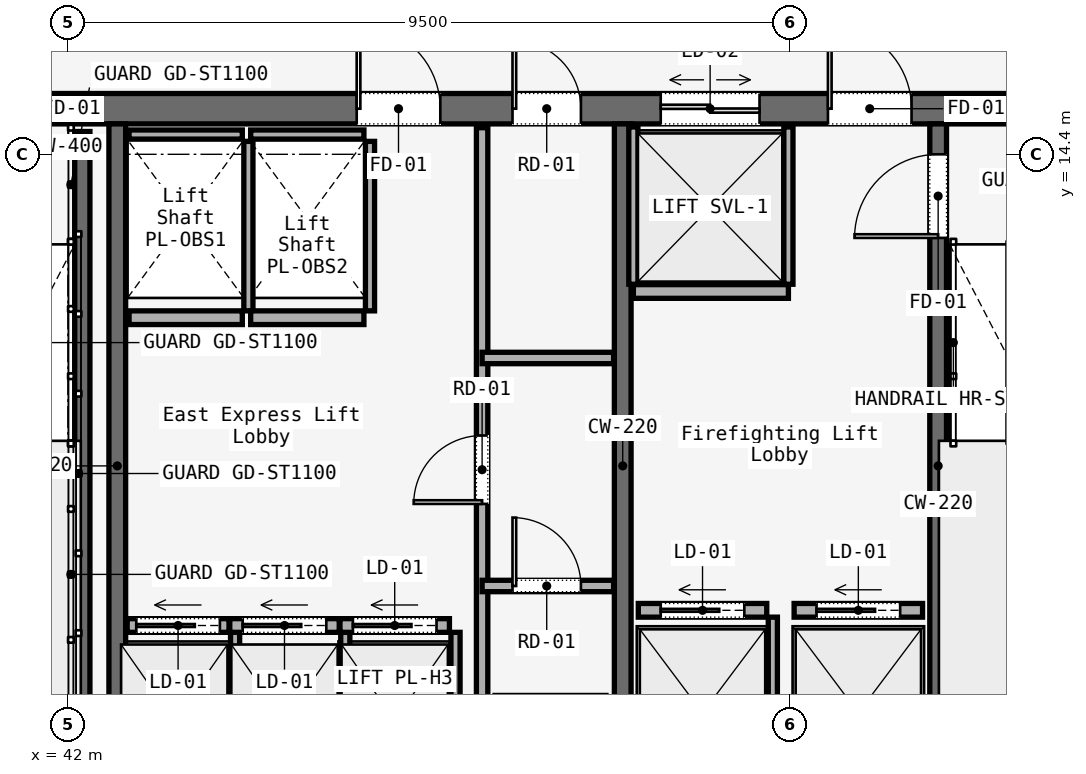
"""IFC4 building model, lengths in metres.
Left out: names, types, materials, properties, quantities, classifications, styles, units other than length and angle.
Written with IfcOpenShell. Run it as: python <this file> out.ifc"""

import sys

from ifc_helpers import new_model, si_unit, direction, frame, frame_2d, origin, place, context, subcontext, project, spatial, rectangle, extrude, element, fill, save


model = new_model("IFC4")
c1 = context("Model", 3, precision=1e-05, world=origin(), true_north=direction((0.0, 1.0)))
c2 = subcontext(c1, "Body", "Model", "MODEL_VIEW")
j1 = project(units=[si_unit("LENGTHUNIT", "METRE"), si_unit("PLANEANGLEUNIT", "RADIAN")], contexts=[c1])
p1 = place(None, origin())
s1 = spatial("IfcSite", under=j1, at=p1, CompositionType="ELEMENT")
p2 = place(p1, origin())
s2 = spatial("IfcBuilding", under=s1, at=p2, CompositionType="ELEMENT")
p3 = place(p2, frame((0.0, 0.0, 244.6)))
s3 = spatial("IfcBuildingStorey", under=s2, at=p3, CompositionType="ELEMENT", Elevation=244.6)
p4 = place(p3, frame((26.45, 15.0, 0.0), z_axis=(0.0, 0.0, 1.0), x_axis=(1.0, 0.0, 0.0)))
e1 = element("IfcWall", 1, at=p4, inside=s3, PredefinedType="SOLIDWALL", context=c2, shape_type="SweptSolid", body=[
    extrude(rectangle(XDim=31.1, YDim=0.4, at=frame_2d((15.55, 0.0))), origin(), (0.0, 0.0, 1.0), 3.58),
])
p5 = place(p4, frame((1.65, 0.0, 0.0)))
e2 = element("IfcOpeningElement", 2, at=p5, cuts=e1, PredefinedType="OPENING", context=c2, shape_type="SweptSolid", body=[
    extrude(rectangle(XDim=1.1, YDim=2.2, at=frame_2d((0.55, 1.1))), frame((0.0, 0.2, 0.0), z_axis=(0.0, -1.0, 0.0), x_axis=(1.0, 0.0, 0.0)), (0.0, 0.0, 1.0), 0.4),
])
p6 = place(p4, frame((13.65, 0.0, 0.0)))
e3 = element("IfcOpeningElement", 3, at=p6, cuts=e1, PredefinedType="OPENING", context=c2, shape_type="SweptSolid", body=[
    extrude(rectangle(XDim=1.1, YDim=2.2, at=frame_2d((0.55, 1.1))), frame((0.0, 0.2, 0.0), z_axis=(0.0, -1.0, 0.0), x_axis=(1.0, 0.0, 0.0)), (0.0, 0.0, 1.0), 0.4),
])
p7 = place(p4, frame((25.55, 0.0, 0.0)))
e4 = element("IfcOpeningElement", 4, at=p7, cuts=e1, PredefinedType="OPENING", context=c2, shape_type="SweptSolid", body=[
    extrude(rectangle(XDim=1.1, YDim=2.2, at=frame_2d((0.55, 1.1))), frame((0.0, 0.2, 0.0), z_axis=(0.0, -1.0, 0.0), x_axis=(1.0, 0.0, 0.0)), (0.0, 0.0, 1.0), 0.4),
])
p8 = place(p4, frame((19.35, 0.0, 0.0)))
e5 = element("IfcOpeningElement", 5, at=p8, cuts=e1, PredefinedType="OPENING", context=c2, shape_type="SweptSolid", body=[
    extrude(rectangle(XDim=1.1, YDim=2.2, at=frame_2d((0.55, 1.1))), frame((0.0, 0.2, 0.0), z_axis=(0.0, -1.0, 0.0), x_axis=(1.0, 0.0, 0.0)), (0.0, 0.0, 1.0), 0.4),
])
p9 = place(p4, frame((21.4, 0.0, 0.0)))
e6 = element("IfcOpeningElement", 6, at=p9, cuts=e1, PredefinedType="OPENING", context=c2, shape_type="SweptSolid", body=[
    extrude(rectangle(XDim=0.9, YDim=2.1, at=frame_2d((0.45, 1.05))), frame((0.0, 0.2, 0.0), z_axis=(0.0, -1.0, 0.0), x_axis=(1.0, 0.0, 0.0)), (0.0, 0.0, 1.0), 0.4),
])
p10 = place(p4, frame((5.54, 0.0, 0.0)))
e7 = element("IfcOpeningElement", 7, at=p10, cuts=e1, PredefinedType="OPENING", context=c2, shape_type="SweptSolid", body=[
    extrude(rectangle(XDim=0.95, YDim=2.2, at=frame_2d((0.475, 1.1))), frame((0.0, 0.2, 0.0), z_axis=(0.0, -1.0, 0.0), x_axis=(1.0, 0.0, 0.0)), (0.0, 0.0, 1.0), 0.4),
])
p11 = place(p4, frame((9.49, 0.0, 0.0)))
e8 = element("IfcOpeningElement", 8, at=p11, cuts=e1, PredefinedType="OPENING", context=c2, shape_type="SweptSolid", body=[
    extrude(rectangle(XDim=0.95, YDim=2.2, at=frame_2d((0.475, 1.1))), frame((0.0, 0.2, 0.0), z_axis=(0.0, -1.0, 0.0), x_axis=(1.0, 0.0, 0.0)), (0.0, 0.0, 1.0), 0.4),
])
p12 = place(p4, frame((23.35, 0.0, 0.0)))
e9 = element("IfcOpeningElement", 9, at=p12, cuts=e1, PredefinedType="OPENING", context=c2, shape_type="SweptSolid", body=[
    extrude(rectangle(XDim=1.3, YDim=2.3, at=frame_2d((0.65, 1.15))), frame((0.0, 0.2, 0.0), z_axis=(0.0, -1.0, 0.0), x_axis=(1.0, 0.0, 0.0)), (0.0, 0.0, 1.0), 0.4),
])
for number, where, z_axis, x_axis in (
    (10, (42.65, 5.8, 0.0), (0.0, 0.0, 1.0), (0.0, 1.0, 0.0)),
    (11, (49.3, 5.8, 0.0), (0.0, 0.0, 1.0), (0.0, 1.0, 0.0)),
):
    element("IfcWall", number, at=place(p3, frame(where, z_axis=z_axis, x_axis=x_axis)), inside=s3, PredefinedType="SOLIDWALL", context=c2, shape_type="SweptSolid", body=[
        extrude(rectangle(XDim=9.0, YDim=0.22, at=frame_2d((4.5, 0.0))), origin(), (0.0, 0.0, 1.0), 3.58),
    ])
p13 = place(p3, frame((53.45, 5.8, 0.0), z_axis=(0.0, 0.0, 1.0), x_axis=(0.0, 1.0, 0.0)))
e12 = element("IfcWall", 12, at=p13, inside=s3, PredefinedType="SOLIDWALL", context=c2, shape_type="SweptSolid", body=[
    extrude(rectangle(XDim=9.0, YDim=0.22, at=frame_2d((4.5, 0.0))), origin(), (0.0, 0.0, 1.0), 3.58),
])
p14 = place(p13, frame((7.5, 0.0, 0.0)))
e13 = element("IfcOpeningElement", 13, at=p14, cuts=e12, PredefinedType="OPENING", context=c2, shape_type="SweptSolid", body=[
    extrude(rectangle(XDim=1.1, YDim=2.2, at=frame_2d((0.55, 1.1))), frame((0.0, 0.11, 0.0), z_axis=(0.0, -1.0, 0.0), x_axis=(1.0, 0.0, 0.0)), (0.0, 0.0, 1.0), 0.22),
])
p15 = place(p3, frame((42.19, 14.7, 0.0), z_axis=(0.0, 0.0, 1.0), x_axis=(0.0, -1.0, 0.0)))
e14 = element("IfcWall", 14, at=p15, inside=s3, PredefinedType="SOLIDWALL", context=c2, shape_type="SweptSolid", body=[
    extrude(rectangle(XDim=7.65, YDim=0.2, at=frame_2d((3.825, 0.0))), origin(), (0.0, 0.0, 1.0), 3.8),
])
p16 = place(p3, frame((47.45, 5.9, 0.0), z_axis=(0.0, 0.0, 1.0), x_axis=(0.0, 1.0, 0.0)))
e15 = element("IfcWall", 15, at=p16, inside=s3, PredefinedType="PARTITIONING", context=c2, shape_type="SweptSolid", body=[
    extrude(rectangle(XDim=8.85, YDim=0.15, at=frame_2d((4.425, 0.0))), origin(), (0.0, 0.0, 1.0), 3.01),
])
p17 = place(p16, frame((3.9, 0.0, 0.0)))
e16 = element("IfcOpeningElement", 16, at=p17, cuts=e15, PredefinedType="OPENING", context=c2, shape_type="SweptSolid", body=[
    extrude(rectangle(XDim=0.9, YDim=2.1, at=frame_2d((0.45, 1.05))), frame((0.0, 0.075, 0.0), z_axis=(0.0, -1.0, 0.0), x_axis=(1.0, 0.0, 0.0)), (0.0, 0.0, 1.0), 0.15),
])
p18 = place(p3, frame((47.45, 8.72, 0.0), z_axis=(0.0, 0.0, 1.0), x_axis=(1.0, 0.0, 0.0)))
e17 = element("IfcWall", 17, at=p18, inside=s3, PredefinedType="PARTITIONING", context=c2, shape_type="SweptSolid", body=[
    extrude(rectangle(XDim=1.73, YDim=0.15, at=frame_2d((0.865, 0.0))), origin(), (0.0, 0.0, 1.0), 3.01),
])
p19 = place(p18, frame((0.4, 0.0, 0.0)))
e18 = element("IfcOpeningElement", 18, at=p19, cuts=e17, PredefinedType="OPENING", context=c2, shape_type="SweptSolid", body=[
    extrude(rectangle(XDim=0.9, YDim=2.1, at=frame_2d((0.45, 1.05))), frame((0.0, 0.075, 0.0), z_axis=(0.0, -1.0, 0.0), x_axis=(1.0, 0.0, 0.0)), (0.0, 0.0, 1.0), 0.15),
])
p20 = place(p3, frame((47.45, 11.72, 0.0), z_axis=(0.0, 0.0, 1.0), x_axis=(1.0, 0.0, 0.0)))
e19 = element("IfcWall", 19, at=p20, inside=s3, PredefinedType="PARTITIONING", context=c2, shape_type="SweptSolid", body=[
    extrude(rectangle(XDim=1.73, YDim=0.15, at=frame_2d((0.865, 0.0))), origin(), (0.0, 0.0, 1.0), 3.01),
])
p21 = place(p3, frame((42.78, 8.2, 0.0), z_axis=(0.0, 0.0, 1.0), x_axis=(1.0, 0.0, 0.0)))
e20 = element("IfcWall", 20, at=p21, inside=s3, PredefinedType="SOLIDWALL", context=c2, shape_type="SweptSolid", body=[
    extrude(rectangle(XDim=1.34, YDim=0.18, at=frame_2d((0.67, 0.0))), origin(), (0.0, 0.0, 1.0), 3.01),
])
p22 = place(p21, frame((0.12, 0.0, 0.0)))
e21 = element("IfcOpeningElement", 21, at=p22, cuts=e20, PredefinedType="OPENING", context=c2, shape_type="SweptSolid", body=[
    extrude(rectangle(XDim=1.1, YDim=2.2, at=frame_2d((0.55, 1.1))), frame((0.0, 0.09, 0.0), z_axis=(0.0, -1.0, 0.0), x_axis=(1.0, 0.0, 0.0)), (0.0, 0.0, 1.0), 0.18),
])
p23 = place(p3, frame((44.2, 5.93, 0.0), z_axis=(0.0, 0.0, 1.0), x_axis=(0.0, 1.0, 0.0)))
e22 = element("IfcWall", 22, at=p23, inside=s3, PredefinedType="SOLIDWALL", context=c2, shape_type="SweptSolid", body=[
    extrude(rectangle(XDim=2.18, YDim=0.12, at=frame_2d((1.09, 0.0))), origin(), (0.0, 0.0, 1.0), 3.01),
])
p24 = place(p3, frame((44.13, 8.2, 0.0), z_axis=(0.0, 0.0, 1.0), x_axis=(1.0, 0.0, 0.0)))
e23 = element("IfcWall", 23, at=p24, inside=s3, PredefinedType="SOLIDWALL", context=c2, shape_type="SweptSolid", body=[
    extrude(rectangle(XDim=1.44, YDim=0.18, at=frame_2d((0.72, 0.0))), origin(), (0.0, 0.0, 1.0), 3.01),
])
p25 = place(p24, frame((0.17, 0.0, 0.0)))
e24 = element("IfcOpeningElement", 24, at=p25, cuts=e23, PredefinedType="OPENING", context=c2, shape_type="SweptSolid", body=[
    extrude(rectangle(XDim=1.1, YDim=2.2, at=frame_2d((0.55, 1.1))), frame((0.0, 0.09, 0.0), z_axis=(0.0, -1.0, 0.0), x_axis=(1.0, 0.0, 0.0)), (0.0, 0.0, 1.0), 0.18),
])
p26 = place(p3, frame((45.65, 5.93, 0.0), z_axis=(0.0, 0.0, 1.0), x_axis=(0.0, 1.0, 0.0)))
e25 = element("IfcWall", 25, at=p26, inside=s3, PredefinedType="SOLIDWALL", context=c2, shape_type="SweptSolid", body=[
    extrude(rectangle(XDim=2.18, YDim=0.12, at=frame_2d((1.09, 0.0))), origin(), (0.0, 0.0, 1.0), 3.01),
])
p27 = place(p3, frame((45.58, 8.2, 0.0), z_axis=(0.0, 0.0, 1.0), x_axis=(1.0, 0.0, 0.0)))
e26 = element("IfcWall", 26, at=p27, inside=s3, PredefinedType="SOLIDWALL", context=c2, shape_type="SweptSolid", body=[
    extrude(rectangle(XDim=1.44, YDim=0.18, at=frame_2d((0.72, 0.0))), origin(), (0.0, 0.0, 1.0), 3.01),
])
p28 = place(p27, frame((0.17, 0.0, 0.0)))
e27 = element("IfcOpeningElement", 27, at=p28, cuts=e26, PredefinedType="OPENING", context=c2, shape_type="SweptSolid", body=[
    extrude(rectangle(XDim=1.1, YDim=2.2, at=frame_2d((0.55, 1.1))), frame((0.0, 0.09, 0.0), z_axis=(0.0, -1.0, 0.0), x_axis=(1.0, 0.0, 0.0)), (0.0, 0.0, 1.0), 0.18),
])
p29 = place(p3, frame((47.1, 5.93, 0.0), z_axis=(0.0, 0.0, 1.0), x_axis=(0.0, 1.0, 0.0)))
e28 = element("IfcWall", 28, at=p29, inside=s3, PredefinedType="SOLIDWALL", context=c2, shape_type="SweptSolid", body=[
    extrude(rectangle(XDim=2.18, YDim=0.12, at=frame_2d((1.09, 0.0))), origin(), (0.0, 0.0, 1.0), 3.01),
])
p30 = place(p3, frame((42.805, 12.25, 0.0), z_axis=(0.0, 0.0, 1.0), x_axis=(1.0, 0.0, 0.0)))
e29 = element("IfcWall", 29, at=p30, inside=s3, PredefinedType="SOLIDWALL", context=c2, shape_type="SweptSolid", body=[
    extrude(rectangle(XDim=1.49, YDim=0.18, at=frame_2d((0.745, 0.0))), origin(), (0.0, 0.0, 1.0), 3.01),
])
p31 = place(p3, frame((42.805, 14.66, 0.0), z_axis=(0.0, 0.0, 1.0), x_axis=(1.0, 0.0, 0.0)))
e30 = element("IfcWall", 30, at=p31, inside=s3, PredefinedType="SOLIDWALL", context=c2, shape_type="SweptSolid", body=[
    extrude(rectangle(XDim=1.49, YDim=0.12, at=frame_2d((0.745, 0.0))), origin(), (0.0, 0.0, 1.0), 3.01),
])
p32 = place(p3, frame((44.375, 12.34, 0.0), z_axis=(0.0, 0.0, 1.0), x_axis=(0.0, 1.0, 0.0)))
e31 = element("IfcWall", 31, at=p32, inside=s3, PredefinedType="SOLIDWALL", context=c2, shape_type="SweptSolid", body=[
    extrude(rectangle(XDim=2.23, YDim=0.12, at=frame_2d((1.115, 0.0))), origin(), (0.0, 0.0, 1.0), 3.01),
])
p33 = place(p3, frame((44.405, 12.25, 0.0), z_axis=(0.0, 0.0, 1.0), x_axis=(1.0, 0.0, 0.0)))
e32 = element("IfcWall", 32, at=p33, inside=s3, PredefinedType="SOLIDWALL", context=c2, shape_type="SweptSolid", body=[
    extrude(rectangle(XDim=1.49, YDim=0.18, at=frame_2d((0.745, 0.0))), origin(), (0.0, 0.0, 1.0), 3.01),
])
p34 = place(p3, frame((44.405, 14.66, 0.0), z_axis=(0.0, 0.0, 1.0), x_axis=(1.0, 0.0, 0.0)))
e33 = element("IfcWall", 33, at=p34, inside=s3, PredefinedType="SOLIDWALL", context=c2, shape_type="SweptSolid", body=[
    extrude(rectangle(XDim=1.49, YDim=0.12, at=frame_2d((0.745, 0.0))), origin(), (0.0, 0.0, 1.0), 3.01),
])
p35 = place(p3, frame((45.975, 12.34, 0.0), z_axis=(0.0, 0.0, 1.0), x_axis=(0.0, 1.0, 0.0)))
e34 = element("IfcWall", 34, at=p35, inside=s3, PredefinedType="SOLIDWALL", context=c2, shape_type="SweptSolid", body=[
    extrude(rectangle(XDim=2.23, YDim=0.12, at=frame_2d((1.115, 0.0))), origin(), (0.0, 0.0, 1.0), 3.01),
])
p36 = place(p3, frame((49.505, 8.4, 0.0), z_axis=(0.0, 0.0, 1.0), x_axis=(1.0, 0.0, 0.0)))
e35 = element("IfcWall", 35, at=p36, inside=s3, PredefinedType="SOLIDWALL", context=c2, shape_type="SweptSolid", body=[
    extrude(rectangle(XDim=1.69, YDim=0.18, at=frame_2d((0.845, 0.0))), origin(), (0.0, 0.0, 1.0), 3.01),
])
p37 = place(p36, frame((0.295, 0.0, 0.0)))
e36 = element("IfcOpeningElement", 36, at=p37, cuts=e35, PredefinedType="OPENING", context=c2, shape_type="SweptSolid", body=[
    extrude(rectangle(XDim=1.1, YDim=2.2, at=frame_2d((0.55, 1.1))), frame((0.0, 0.09, 0.0), z_axis=(0.0, -1.0, 0.0), x_axis=(1.0, 0.0, 0.0)), (0.0, 0.0, 1.0), 0.18),
])
p38 = place(p3, frame((51.275, 5.93, 0.0), z_axis=(0.0, 0.0, 1.0), x_axis=(0.0, 1.0, 0.0)))
e37 = element("IfcWall", 37, at=p38, inside=s3, PredefinedType="SOLIDWALL", context=c2, shape_type="SweptSolid", body=[
    extrude(rectangle(XDim=2.38, YDim=0.12, at=frame_2d((1.19, 0.0))), origin(), (0.0, 0.0, 1.0), 3.01),
])
p39 = place(p3, frame((51.555, 8.4, 0.0), z_axis=(0.0, 0.0, 1.0), x_axis=(1.0, 0.0, 0.0)))
e38 = element("IfcWall", 38, at=p39, inside=s3, PredefinedType="SOLIDWALL", context=c2, shape_type="SweptSolid", body=[
    extrude(rectangle(XDim=1.69, YDim=0.18, at=frame_2d((0.845, 0.0))), origin(), (0.0, 0.0, 1.0), 3.01),
])
p40 = place(p39, frame((0.295, 0.0, 0.0)))
e39 = element("IfcOpeningElement", 39, at=p40, cuts=e38, PredefinedType="OPENING", context=c2, shape_type="SweptSolid", body=[
    extrude(rectangle(XDim=1.1, YDim=2.2, at=frame_2d((0.55, 1.1))), frame((0.0, 0.09, 0.0), z_axis=(0.0, -1.0, 0.0), x_axis=(1.0, 0.0, 0.0)), (0.0, 0.0, 1.0), 0.18),
])
p41 = place(p3, frame((49.44, 12.595, 0.0), z_axis=(0.0, 0.0, 1.0), x_axis=(1.0, 0.0, 0.0)))
e40 = element("IfcWall", 40, at=p41, inside=s3, PredefinedType="SOLIDWALL", context=c2, shape_type="SweptSolid", body=[
    extrude(rectangle(XDim=2.04, YDim=0.18, at=frame_2d((1.02, 0.0))), origin(), (0.0, 0.0, 1.0), 3.01),
])
for number, where, z_axis, x_axis in (
    (41, (49.44, 12.69, 0.0), (0.0, 0.0, 1.0), (0.0, 1.0, 0.0)),
    (42, (51.48, 12.69, 0.0), (0.0, 0.0, 1.0), (0.0, 1.0, 0.0)),
):
    element("IfcWall", number, at=place(p3, frame(where, z_axis=z_axis, x_axis=x_axis)), inside=s3, PredefinedType="SOLIDWALL", context=c2, shape_type="SweptSolid", body=[
        extrude(rectangle(XDim=2.07, YDim=0.12, at=frame_2d((1.035, 0.0))), origin(), (0.0, 0.0, 1.0), 3.01),
    ])
p42 = place(p7, origin())
e43 = element("IfcDoor", 43, at=p42, inside=s3, OperationType="SINGLE_SWING_RIGHT", PredefinedType="DOOR", context=c2, shape_type="SweptSolid", body=[
    extrude(rectangle(XDim=1.1, YDim=2.2, at=frame_2d((0.55, 1.1))), frame((0.0, 0.025, 0.0), z_axis=(0.0, -1.0, 0.0), x_axis=(1.0, 0.0, 0.0)), (0.0, 0.0, 1.0), 0.05),
])
fill(e4, e43)
p43 = place(p8, origin())
e44 = element("IfcDoor", 44, at=p43, inside=s3, OperationType="SINGLE_SWING_LEFT", PredefinedType="DOOR", context=c2, shape_type="SweptSolid", body=[
    extrude(rectangle(XDim=1.1, YDim=2.2, at=frame_2d((0.55, 1.1))), frame((0.0, 0.025, 0.0), z_axis=(0.0, -1.0, 0.0), x_axis=(1.0, 0.0, 0.0)), (0.0, 0.0, 1.0), 0.05),
])
fill(e5, e44)
p44 = place(p9, origin())
e45 = element("IfcDoor", 45, at=p44, inside=s3, OperationType="SINGLE_SWING_LEFT", PredefinedType="DOOR", context=c2, shape_type="SweptSolid", body=[
    extrude(rectangle(XDim=0.9, YDim=2.1, at=frame_2d((0.45, 1.05))), frame((0.0, 0.025, 0.0), z_axis=(0.0, -1.0, 0.0), x_axis=(1.0, 0.0, 0.0)), (0.0, 0.0, 1.0), 0.05),
])
fill(e6, e45)
p45 = place(p14, origin())
e46 = element("IfcDoor", 46, at=p45, inside=s3, OperationType="SINGLE_SWING_LEFT", PredefinedType="DOOR", context=c2, shape_type="SweptSolid", body=[
    extrude(rectangle(XDim=1.1, YDim=2.2, at=frame_2d((0.55, 1.1))), frame((0.0, 0.025, 0.0), z_axis=(0.0, -1.0, 0.0), x_axis=(1.0, 0.0, 0.0)), (0.0, 0.0, 1.0), 0.05),
])
fill(e13, e46)
p46 = place(p17, origin())
e47 = element("IfcDoor", 47, at=p46, inside=s3, OperationType="SINGLE_SWING_LEFT", PredefinedType="DOOR", context=c2, shape_type="SweptSolid", body=[
    extrude(rectangle(XDim=0.9, YDim=2.1, at=frame_2d((0.45, 1.05))), frame((0.0, 0.025, 0.0), z_axis=(0.0, -1.0, 0.0), x_axis=(1.0, 0.0, 0.0)), (0.0, 0.0, 1.0), 0.05),
])
fill(e16, e47)
p47 = place(p19, origin())
e48 = element("IfcDoor", 48, at=p47, inside=s3, OperationType="SINGLE_SWING_RIGHT", PredefinedType="DOOR", context=c2, shape_type="SweptSolid", body=[
    extrude(rectangle(XDim=0.9, YDim=2.1, at=frame_2d((0.45, 1.05))), frame((0.0, 0.025, 0.0), z_axis=(0.0, -1.0, 0.0), x_axis=(1.0, 0.0, 0.0)), (0.0, 0.0, 1.0), 0.05),
])
fill(e18, e48)
p48 = place(p22, origin())
e49 = element("IfcDoor", 49, at=p48, inside=s3, OperationType="SLIDING_TO_LEFT", PredefinedType="DOOR", context=c2, shape_type="SweptSolid", body=[
    extrude(rectangle(XDim=1.1, YDim=2.2, at=frame_2d((0.55, 1.1))), frame((0.0, 0.025, 0.0), z_axis=(0.0, -1.0, 0.0), x_axis=(1.0, 0.0, 0.0)), (0.0, 0.0, 1.0), 0.05),
])
fill(e21, e49)
p49 = place(p25, origin())
e50 = element("IfcDoor", 50, at=p49, inside=s3, OperationType="SLIDING_TO_LEFT", PredefinedType="DOOR", context=c2, shape_type="SweptSolid", body=[
    extrude(rectangle(XDim=1.1, YDim=2.2, at=frame_2d((0.55, 1.1))), frame((0.0, 0.025, 0.0), z_axis=(0.0, -1.0, 0.0), x_axis=(1.0, 0.0, 0.0)), (0.0, 0.0, 1.0), 0.05),
])
fill(e24, e50)
p50 = place(p28, origin())
e51 = element("IfcDoor", 51, at=p50, inside=s3, OperationType="SLIDING_TO_LEFT", PredefinedType="DOOR", context=c2, shape_type="SweptSolid", body=[
    extrude(rectangle(XDim=1.1, YDim=2.2, at=frame_2d((0.55, 1.1))), frame((0.0, 0.025, 0.0), z_axis=(0.0, -1.0, 0.0), x_axis=(1.0, 0.0, 0.0)), (0.0, 0.0, 1.0), 0.05),
])
fill(e27, e51)
p51 = place(p37, origin())
e52 = element("IfcDoor", 52, at=p51, inside=s3, OperationType="SLIDING_TO_LEFT", PredefinedType="DOOR", context=c2, shape_type="SweptSolid", body=[
    extrude(rectangle(XDim=1.1, YDim=2.2, at=frame_2d((0.55, 1.1))), frame((0.0, 0.025, 0.0), z_axis=(0.0, -1.0, 0.0), x_axis=(1.0, 0.0, 0.0)), (0.0, 0.0, 1.0), 0.05),
])
fill(e36, e52)
p52 = place(p40, origin())
e53 = element("IfcDoor", 53, at=p52, inside=s3, OperationType="SLIDING_TO_LEFT", PredefinedType="DOOR", context=c2, shape_type="SweptSolid", body=[
    extrude(rectangle(XDim=1.1, YDim=2.2, at=frame_2d((0.55, 1.1))), frame((0.0, 0.025, 0.0), z_axis=(0.0, -1.0, 0.0), x_axis=(1.0, 0.0, 0.0)), (0.0, 0.0, 1.0), 0.05),
])
fill(e39, e53)
p53 = place(p12, origin())
e54 = element("IfcDoor", 54, at=p53, inside=s3, OperationType="DOUBLE_DOOR_SLIDING", PredefinedType="DOOR", context=c2, shape_type="SweptSolid", body=[
    extrude(rectangle(XDim=1.3, YDim=2.3, at=frame_2d((0.65, 1.15))), frame((0.0, 0.025, 0.0), z_axis=(0.0, -1.0, 0.0), x_axis=(1.0, 0.0, 0.0)), (0.0, 0.0, 1.0), 0.05),
])
fill(e9, e54)
save(model, sys.argv[1])
